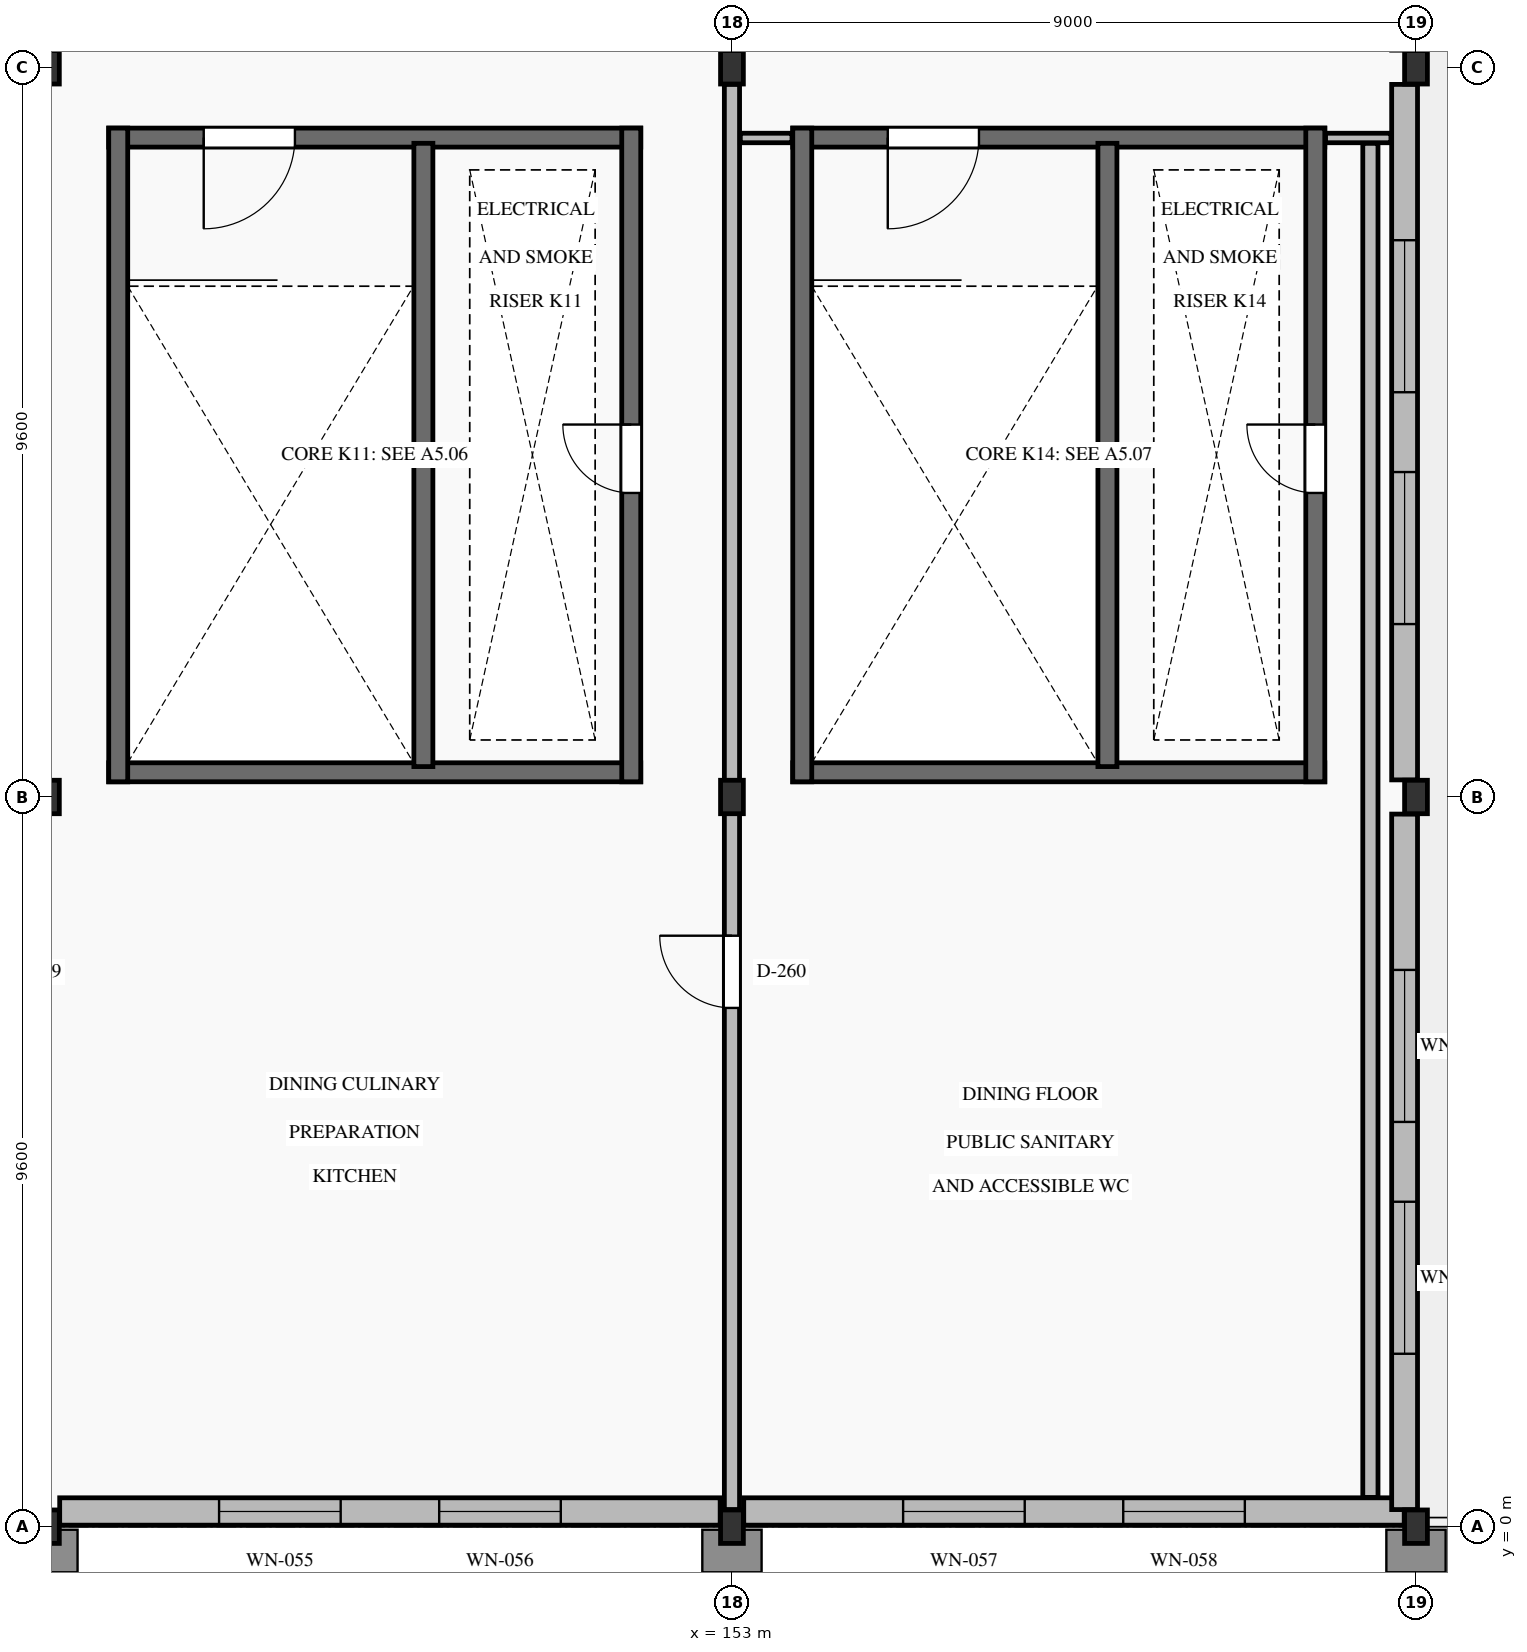
"""IFC4 building model, lengths in metres.
Left out: names, types, materials, properties, quantities, classifications, styles, units other than length and angle.
Written with IfcOpenShell. Run it as: python <this file> out.ifc"""

import sys

from ifc_helpers import new_model, si_unit, direction, frame, frame_2d, origin, origin_2d, place, context, subcontext, project, spatial, rectangle, i_section, extrude, element, fill, save


model = new_model("IFC4")
c1 = context("Model", 3, precision=1e-05, world=origin(), true_north=direction((0.0, 1.0)))
c2 = subcontext(c1, "Body", "Model", "MODEL_VIEW")
j1 = project(units=[si_unit("LENGTHUNIT", "METRE"), si_unit("PLANEANGLEUNIT", "RADIAN")], contexts=[c1])
p1 = place(None, origin())
s1 = spatial("IfcSite", under=j1, at=p1, CompositionType="ELEMENT")
p2 = place(p1, origin())
s2 = spatial("IfcBuilding", under=s1, at=p2, CompositionType="ELEMENT")
p3 = place(p2, frame((0.0, 0.0, 10.8)))
s3 = spatial("IfcBuildingStorey", under=s2, at=p3, CompositionType="ELEMENT", Elevation=10.8)
for number, where, z_axis, x_axis in (
    (1, (144.0, 0.0, 0.0), (0.0, 0.0, 1.0), (1.0, 0.0, 0.0)),
    (2, (144.0, 9.6, 0.0), (0.0, 0.0, 1.0), (1.0, 0.0, 0.0)),
    (3, (144.0, 19.2, 0.0), (0.0, 0.0, 1.0), (1.0, 0.0, 0.0)),
    (4, (153.0, 0.0, 0.0), (0.0, 0.0, 1.0), (1.0, 0.0, 0.0)),
    (5, (153.0, 9.6, 0.0), (0.0, 0.0, 1.0), (1.0, 0.0, 0.0)),
    (6, (153.0, 19.2, 0.0), (0.0, 0.0, 1.0), (1.0, 0.0, 0.0)),
    (7, (162.0, 0.0, 0.0), (0.0, 0.0, 1.0), (1.0, 0.0, 0.0)),
    (8, (162.0, 9.6, 0.0), (0.0, 0.0, 1.0), (1.0, 0.0, 0.0)),
    (9, (162.0, 19.2, 0.0), (0.0, 0.0, 1.0), (1.0, 0.0, 0.0)),
):
    element("IfcColumn", number, at=place(p3, frame(where, z_axis=z_axis, x_axis=x_axis)), inside=s3, PredefinedType="COLUMN", context=c2, shape_type="SweptSolid", body=[
        extrude(i_section(OverallWidth=0.3, OverallDepth=0.44, WebThickness=0.011, FlangeThickness=0.021, FilletRadius=0.027, at=origin_2d()), origin(), (0.0, 0.0, 1.0), 4.2),
    ])
p4 = place(p3, frame((144.155, 0.2, 0.0), z_axis=(0.0, 0.0, 1.0), x_axis=(1.0, 0.0, 0.0)))
e10 = element("IfcWall", 10, at=p4, inside=s3, PredefinedType="SOLIDWALL", context=c2, shape_type="SweptSolid", body=[
    extrude(rectangle(XDim=8.69, YDim=0.36, at=frame_2d((4.345, 0.0))), origin(), (0.0, 0.0, 1.0), 3.665),
])
p5 = place(p4, frame((2.097, 0.0, 0.95)))
e11 = element("IfcOpeningElement", 11, at=p5, cuts=e10, PredefinedType="OPENING", context=c2, shape_type="SweptSolid", body=[
    extrude(rectangle(XDim=1.6, YDim=2.2, at=frame_2d((0.8, 1.1))), frame((0.0, 0.195, 0.0), z_axis=(0.0, -1.0, 0.0), x_axis=(1.0, 0.0, 0.0)), (0.0, 0.0, 1.0), 0.39),
])
p6 = place(p4, frame((4.993, 0.0, 0.95)))
e12 = element("IfcOpeningElement", 12, at=p6, cuts=e10, PredefinedType="OPENING", context=c2, shape_type="SweptSolid", body=[
    extrude(rectangle(XDim=1.6, YDim=2.2, at=frame_2d((0.8, 1.1))), frame((0.0, 0.195, 0.0), z_axis=(0.0, -1.0, 0.0), x_axis=(1.0, 0.0, 0.0)), (0.0, 0.0, 1.0), 0.39),
])
p7 = place(p3, frame((153.155, 0.2, 0.0), z_axis=(0.0, 0.0, 1.0), x_axis=(1.0, 0.0, 0.0)))
e13 = element("IfcWall", 13, at=p7, inside=s3, PredefinedType="SOLIDWALL", context=c2, shape_type="SweptSolid", body=[
    extrude(rectangle(XDim=8.69, YDim=0.36, at=frame_2d((4.345, 0.0))), origin(), (0.0, 0.0, 1.0), 3.665),
])
p8 = place(p7, frame((2.097, 0.0, 0.95)))
e14 = element("IfcOpeningElement", 14, at=p8, cuts=e13, PredefinedType="OPENING", context=c2, shape_type="SweptSolid", body=[
    extrude(rectangle(XDim=1.6, YDim=2.2, at=frame_2d((0.8, 1.1))), frame((0.0, 0.195, 0.0), z_axis=(0.0, -1.0, 0.0), x_axis=(1.0, 0.0, 0.0)), (0.0, 0.0, 1.0), 0.39),
])
p9 = place(p7, frame((4.993, 0.0, 0.95)))
e15 = element("IfcOpeningElement", 15, at=p9, cuts=e13, PredefinedType="OPENING", context=c2, shape_type="SweptSolid", body=[
    extrude(rectangle(XDim=1.6, YDim=2.2, at=frame_2d((0.8, 1.1))), frame((0.0, 0.195, 0.0), z_axis=(0.0, -1.0, 0.0), x_axis=(1.0, 0.0, 0.0)), (0.0, 0.0, 1.0), 0.39),
])
p10 = place(p3, frame((161.85, 0.225, 0.0), z_axis=(0.0, 0.0, 1.0), x_axis=(0.0, 1.0, 0.0)))
e16 = element("IfcWall", 16, at=p10, inside=s3, PredefinedType="SOLIDWALL", context=c2, shape_type="SweptSolid", body=[
    extrude(rectangle(XDim=9.15, YDim=0.34, at=frame_2d((4.575, 0.0))), origin(), (0.0, 0.0, 1.0), 3.645),
])
p11 = place(p10, frame((2.05, 0.0, 0.95)))
e17 = element("IfcOpeningElement", 17, at=p11, cuts=e16, PredefinedType="OPENING", context=c2, shape_type="SweptSolid", body=[
    extrude(rectangle(XDim=2.0, YDim=2.4, at=frame_2d((1.0, 1.2))), frame((0.0, 0.185, 0.0), z_axis=(0.0, -1.0, 0.0), x_axis=(1.0, 0.0, 0.0)), (0.0, 0.0, 1.0), 0.37),
])
p12 = place(p10, frame((5.1, 0.0, 0.95)))
e18 = element("IfcOpeningElement", 18, at=p12, cuts=e16, PredefinedType="OPENING", context=c2, shape_type="SweptSolid", body=[
    extrude(rectangle(XDim=2.0, YDim=2.4, at=frame_2d((1.0, 1.2))), frame((0.0, 0.185, 0.0), z_axis=(0.0, -1.0, 0.0), x_axis=(1.0, 0.0, 0.0)), (0.0, 0.0, 1.0), 0.37),
])
p13 = place(p3, frame((161.85, 9.825, 0.0), z_axis=(0.0, 0.0, 1.0), x_axis=(0.0, 1.0, 0.0)))
e19 = element("IfcWall", 19, at=p13, inside=s3, PredefinedType="SOLIDWALL", context=c2, shape_type="SweptSolid", body=[
    extrude(rectangle(XDim=9.15, YDim=0.34, at=frame_2d((4.575, 0.0))), origin(), (0.0, 0.0, 1.0), 3.645),
])
p14 = place(p13, frame((2.05, 0.0, 0.95)))
e20 = element("IfcOpeningElement", 20, at=p14, cuts=e19, PredefinedType="OPENING", context=c2, shape_type="SweptSolid", body=[
    extrude(rectangle(XDim=2.0, YDim=2.4, at=frame_2d((1.0, 1.2))), frame((0.0, 0.185, 0.0), z_axis=(0.0, -1.0, 0.0), x_axis=(1.0, 0.0, 0.0)), (0.0, 0.0, 1.0), 0.37),
])
p15 = place(p13, frame((5.1, 0.0, 0.95)))
e21 = element("IfcOpeningElement", 21, at=p15, cuts=e19, PredefinedType="OPENING", context=c2, shape_type="SweptSolid", body=[
    extrude(rectangle(XDim=2.0, YDim=2.4, at=frame_2d((1.0, 1.2))), frame((0.0, 0.185, 0.0), z_axis=(0.0, -1.0, 0.0), x_axis=(1.0, 0.0, 0.0)), (0.0, 0.0, 1.0), 0.37),
])
p16 = place(p3, frame((144.8, 9.925, 0.0), z_axis=(0.0, 0.0, 1.0), x_axis=(1.0, 0.0, 0.0)))
e22 = element("IfcWall", 22, at=p16, inside=s3, PredefinedType="SHEAR", context=c2, shape_type="SweptSolid", body=[
    extrude(rectangle(XDim=7.0, YDim=0.25, at=frame_2d((3.5, 0.0))), origin(), (0.0, 0.0, 1.0), 4.2),
])
p17 = place(p3, frame((144.8, 18.275, 0.0), z_axis=(0.0, 0.0, 1.0), x_axis=(1.0, 0.0, 0.0)))
e23 = element("IfcWall", 23, at=p17, inside=s3, PredefinedType="SHEAR", context=c2, shape_type="SweptSolid", body=[
    extrude(rectangle(XDim=7.0, YDim=0.25, at=frame_2d((3.5, 0.0))), origin(), (0.0, 0.0, 1.0), 4.2),
])
p18 = place(p17, frame((1.25, 0.0, 0.0)))
e24 = element("IfcOpeningElement", 24, at=p18, cuts=e23, PredefinedType="OPENING", context=c2, shape_type="SweptSolid", body=[
    extrude(rectangle(XDim=1.2, YDim=2.15, at=frame_2d((0.6, 1.075))), frame((0.0, 0.14, 0.0), z_axis=(0.0, -1.0, 0.0), x_axis=(1.0, 0.0, 0.0)), (0.0, 0.0, 1.0), 0.28),
])
p19 = place(p3, frame((144.925, 9.8, 0.0), z_axis=(0.0, 0.0, 1.0), x_axis=(0.0, 1.0, 0.0)))
e25 = element("IfcWall", 25, at=p19, inside=s3, PredefinedType="SHEAR", context=c2, shape_type="SweptSolid", body=[
    extrude(rectangle(XDim=8.6, YDim=0.25, at=frame_2d((4.3, 0.0))), origin(), (0.0, 0.0, 1.0), 4.2),
])
p20 = place(p3, frame((151.675, 9.8, 0.0), z_axis=(0.0, 0.0, 1.0), x_axis=(0.0, 1.0, 0.0)))
e26 = element("IfcWall", 26, at=p20, inside=s3, PredefinedType="SHEAR", context=c2, shape_type="SweptSolid", body=[
    extrude(rectangle(XDim=8.6, YDim=0.25, at=frame_2d((4.3, 0.0))), origin(), (0.0, 0.0, 1.0), 4.2),
])
p21 = place(p20, frame((3.8, 0.0, 0.0)))
e27 = element("IfcOpeningElement", 27, at=p21, cuts=e26, PredefinedType="OPENING", context=c2, shape_type="SweptSolid", body=[
    extrude(rectangle(XDim=0.9, YDim=2.05, at=frame_2d((0.45, 1.025))), frame((0.0, 0.14, 0.0), z_axis=(0.0, -1.0, 0.0), x_axis=(1.0, 0.0, 0.0)), (0.0, 0.0, 1.0), 0.28),
])
p22 = place(p3, frame((148.94, 10.0, 0.0), z_axis=(0.0, 0.0, 1.0), x_axis=(0.0, 1.0, 0.0)))
e28 = element("IfcWall", 28, at=p22, inside=s3, PredefinedType="SHEAR", context=c2, shape_type="SweptSolid", body=[
    extrude(rectangle(XDim=8.2, YDim=0.25, at=frame_2d((4.1, 0.0))), origin(), (0.0, 0.0, 1.0), 4.2),
])
p23 = place(p3, frame((153.8, 9.925, 0.0), z_axis=(0.0, 0.0, 1.0), x_axis=(1.0, 0.0, 0.0)))
e29 = element("IfcWall", 29, at=p23, inside=s3, PredefinedType="SHEAR", context=c2, shape_type="SweptSolid", body=[
    extrude(rectangle(XDim=7.0, YDim=0.25, at=frame_2d((3.5, 0.0))), origin(), (0.0, 0.0, 1.0), 4.2),
])
p24 = place(p3, frame((153.8, 18.275, 0.0), z_axis=(0.0, 0.0, 1.0), x_axis=(1.0, 0.0, 0.0)))
e30 = element("IfcWall", 30, at=p24, inside=s3, PredefinedType="SHEAR", context=c2, shape_type="SweptSolid", body=[
    extrude(rectangle(XDim=7.0, YDim=0.25, at=frame_2d((3.5, 0.0))), origin(), (0.0, 0.0, 1.0), 4.2),
])
p25 = place(p24, frame((1.25, 0.0, 0.0)))
e31 = element("IfcOpeningElement", 31, at=p25, cuts=e30, PredefinedType="OPENING", context=c2, shape_type="SweptSolid", body=[
    extrude(rectangle(XDim=1.2, YDim=2.15, at=frame_2d((0.6, 1.075))), frame((0.0, 0.14, 0.0), z_axis=(0.0, -1.0, 0.0), x_axis=(1.0, 0.0, 0.0)), (0.0, 0.0, 1.0), 0.28),
])
p26 = place(p3, frame((153.925, 9.8, 0.0), z_axis=(0.0, 0.0, 1.0), x_axis=(0.0, 1.0, 0.0)))
e32 = element("IfcWall", 32, at=p26, inside=s3, PredefinedType="SHEAR", context=c2, shape_type="SweptSolid", body=[
    extrude(rectangle(XDim=8.6, YDim=0.25, at=frame_2d((4.3, 0.0))), origin(), (0.0, 0.0, 1.0), 4.2),
])
p27 = place(p3, frame((160.675, 9.8, 0.0), z_axis=(0.0, 0.0, 1.0), x_axis=(0.0, 1.0, 0.0)))
e33 = element("IfcWall", 33, at=p27, inside=s3, PredefinedType="SHEAR", context=c2, shape_type="SweptSolid", body=[
    extrude(rectangle(XDim=8.6, YDim=0.25, at=frame_2d((4.3, 0.0))), origin(), (0.0, 0.0, 1.0), 4.2),
])
p28 = place(p27, frame((3.8, 0.0, 0.0)))
e34 = element("IfcOpeningElement", 34, at=p28, cuts=e33, PredefinedType="OPENING", context=c2, shape_type="SweptSolid", body=[
    extrude(rectangle(XDim=0.9, YDim=2.05, at=frame_2d((0.45, 1.025))), frame((0.0, 0.14, 0.0), z_axis=(0.0, -1.0, 0.0), x_axis=(1.0, 0.0, 0.0)), (0.0, 0.0, 1.0), 0.28),
])
p29 = place(p3, frame((157.94, 10.0, 0.0), z_axis=(0.0, 0.0, 1.0), x_axis=(0.0, 1.0, 0.0)))
e35 = element("IfcWall", 35, at=p29, inside=s3, PredefinedType="SHEAR", context=c2, shape_type="SweptSolid", body=[
    extrude(rectangle(XDim=8.2, YDim=0.25, at=frame_2d((4.1, 0.0))), origin(), (0.0, 0.0, 1.0), 4.2),
])
p30 = place(p3, frame((153.0, 0.225, 0.0), z_axis=(0.0, 0.0, 1.0), x_axis=(0.0, 1.0, 0.0)))
e36 = element("IfcWall", 36, at=p30, inside=s3, PredefinedType="PARTITIONING", context=c2, shape_type="SweptSolid", body=[
    extrude(rectangle(XDim=18.75, YDim=0.2, at=frame_2d((9.375, 0.0))), origin(), (0.0, 0.0, 1.0), 3.615),
])
p31 = place(p30, frame((6.6, 0.0, 0.0)))
e37 = element("IfcOpeningElement", 37, at=p31, cuts=e36, PredefinedType="OPENING", context=c2, shape_type="SweptSolid", body=[
    extrude(rectangle(XDim=0.95, YDim=2.1, at=frame_2d((0.475, 1.05))), frame((0.0, 0.115, 0.0), z_axis=(0.0, -1.0, 0.0), x_axis=(1.0, 0.0, 0.0)), (0.0, 0.0, 1.0), 0.23),
])
p32 = place(p3, frame((161.4, 0.385, 0.0), z_axis=(0.0, 0.0, 1.0), x_axis=(0.0, 1.0, 0.0)))
e38 = element("IfcWall", 38, at=p32, inside=s3, PredefinedType="PARTITIONING", context=c2, shape_type="SweptSolid", body=[
    extrude(rectangle(XDim=17.815, YDim=0.2, at=frame_2d((8.907, 0.0))), origin(), (0.0, 0.0, 1.0), 3.94),
])
p33 = place(p3, frame((153.11, 18.27, 0.0), z_axis=(0.0, 0.0, 1.0), x_axis=(1.0, 0.0, 0.0)))
e39 = element("IfcWall", 39, at=p33, inside=s3, PredefinedType="PARTITIONING", context=c2, shape_type="SweptSolid", body=[
    extrude(rectangle(XDim=0.68, YDim=0.125, at=frame_2d((0.34, 0.0))), origin(), (0.0, 0.0, 1.0), 3.94),
])
p34 = place(p3, frame((160.81, 18.27, 0.0), z_axis=(0.0, 0.0, 1.0), x_axis=(1.0, 0.0, 0.0)))
e40 = element("IfcWall", 40, at=p34, inside=s3, PredefinedType="PARTITIONING", context=c2, shape_type="SweptSolid", body=[
    extrude(rectangle(XDim=0.86, YDim=0.125, at=frame_2d((0.43, 0.0))), origin(), (0.0, 0.0, 1.0), 3.94),
])
p35 = place(p5, origin())
e41 = element("IfcWindow", 41, at=p35, inside=s3, PartitioningType="SINGLE_PANEL", PredefinedType="WINDOW", context=c2, shape_type="SweptSolid", body=[
    extrude(rectangle(XDim=1.6, YDim=2.2, at=frame_2d((0.8, 1.1))), frame((0.0, 0.03, 0.0), z_axis=(0.0, -1.0, 0.0), x_axis=(1.0, 0.0, 0.0)), (0.0, 0.0, 1.0), 0.06),
])
fill(e11, e41)
p36 = place(p6, origin())
e42 = element("IfcWindow", 42, at=p36, inside=s3, PartitioningType="SINGLE_PANEL", PredefinedType="WINDOW", context=c2, shape_type="SweptSolid", body=[
    extrude(rectangle(XDim=1.6, YDim=2.2, at=frame_2d((0.8, 1.1))), frame((0.0, 0.03, 0.0), z_axis=(0.0, -1.0, 0.0), x_axis=(1.0, 0.0, 0.0)), (0.0, 0.0, 1.0), 0.06),
])
fill(e12, e42)
p37 = place(p8, origin())
e43 = element("IfcWindow", 43, at=p37, inside=s3, PartitioningType="SINGLE_PANEL", PredefinedType="WINDOW", context=c2, shape_type="SweptSolid", body=[
    extrude(rectangle(XDim=1.6, YDim=2.2, at=frame_2d((0.8, 1.1))), frame((0.0, 0.03, 0.0), z_axis=(0.0, -1.0, 0.0), x_axis=(1.0, 0.0, 0.0)), (0.0, 0.0, 1.0), 0.06),
])
fill(e14, e43)
p38 = place(p9, origin())
e44 = element("IfcWindow", 44, at=p38, inside=s3, PartitioningType="SINGLE_PANEL", PredefinedType="WINDOW", context=c2, shape_type="SweptSolid", body=[
    extrude(rectangle(XDim=1.6, YDim=2.2, at=frame_2d((0.8, 1.1))), frame((0.0, 0.03, 0.0), z_axis=(0.0, -1.0, 0.0), x_axis=(1.0, 0.0, 0.0)), (0.0, 0.0, 1.0), 0.06),
])
fill(e15, e44)
p39 = place(p11, origin())
e45 = element("IfcWindow", 45, at=p39, inside=s3, PartitioningType="SINGLE_PANEL", PredefinedType="WINDOW", context=c2, shape_type="SweptSolid", body=[
    extrude(rectangle(XDim=2.0, YDim=2.4, at=frame_2d((1.0, 1.2))), frame((0.0, 0.03, 0.0), z_axis=(0.0, -1.0, 0.0), x_axis=(1.0, 0.0, 0.0)), (0.0, 0.0, 1.0), 0.06),
])
fill(e17, e45)
p40 = place(p12, origin())
e46 = element("IfcWindow", 46, at=p40, inside=s3, PartitioningType="SINGLE_PANEL", PredefinedType="WINDOW", context=c2, shape_type="SweptSolid", body=[
    extrude(rectangle(XDim=2.0, YDim=2.4, at=frame_2d((1.0, 1.2))), frame((0.0, 0.03, 0.0), z_axis=(0.0, -1.0, 0.0), x_axis=(1.0, 0.0, 0.0)), (0.0, 0.0, 1.0), 0.06),
])
fill(e18, e46)
p41 = place(p14, origin())
e47 = element("IfcWindow", 47, at=p41, inside=s3, PartitioningType="SINGLE_PANEL", PredefinedType="WINDOW", context=c2, shape_type="SweptSolid", body=[
    extrude(rectangle(XDim=2.0, YDim=2.4, at=frame_2d((1.0, 1.2))), frame((0.0, 0.03, 0.0), z_axis=(0.0, -1.0, 0.0), x_axis=(1.0, 0.0, 0.0)), (0.0, 0.0, 1.0), 0.06),
])
fill(e20, e47)
p42 = place(p15, origin())
e48 = element("IfcWindow", 48, at=p42, inside=s3, PartitioningType="SINGLE_PANEL", PredefinedType="WINDOW", context=c2, shape_type="SweptSolid", body=[
    extrude(rectangle(XDim=2.0, YDim=2.4, at=frame_2d((1.0, 1.2))), frame((0.0, 0.03, 0.0), z_axis=(0.0, -1.0, 0.0), x_axis=(1.0, 0.0, 0.0)), (0.0, 0.0, 1.0), 0.06),
])
fill(e21, e48)
p43 = place(p18, frame((1.2, 0.0, 0.0), z_axis=(0.0, 0.0, 1.0), x_axis=(-1.0, 0.0, 0.0)))
e49 = element("IfcDoor", 49, at=p43, inside=s3, OperationType="SINGLE_SWING_LEFT", PredefinedType="DOOR", context=c2, shape_type="SweptSolid", body=[
    extrude(rectangle(XDim=1.2, YDim=2.15, at=frame_2d((0.6, 1.075))), frame((0.0, 0.025, 0.0), z_axis=(0.0, -1.0, 0.0), x_axis=(1.0, 0.0, 0.0)), (0.0, 0.0, 1.0), 0.05),
])
fill(e24, e49)
p44 = place(p21, origin())
e50 = element("IfcDoor", 50, at=p44, inside=s3, OperationType="SINGLE_SWING_RIGHT", PredefinedType="DOOR", context=c2, shape_type="SweptSolid", body=[
    extrude(rectangle(XDim=0.9, YDim=2.05, at=frame_2d((0.45, 1.025))), frame((0.0, 0.025, 0.0), z_axis=(0.0, -1.0, 0.0), x_axis=(1.0, 0.0, 0.0)), (0.0, 0.0, 1.0), 0.05),
])
fill(e27, e50)
p45 = place(p25, frame((1.2, 0.0, 0.0), z_axis=(0.0, 0.0, 1.0), x_axis=(-1.0, 0.0, 0.0)))
e51 = element("IfcDoor", 51, at=p45, inside=s3, OperationType="SINGLE_SWING_LEFT", PredefinedType="DOOR", context=c2, shape_type="SweptSolid", body=[
    extrude(rectangle(XDim=1.2, YDim=2.15, at=frame_2d((0.6, 1.075))), frame((0.0, 0.025, 0.0), z_axis=(0.0, -1.0, 0.0), x_axis=(1.0, 0.0, 0.0)), (0.0, 0.0, 1.0), 0.05),
])
fill(e31, e51)
p46 = place(p28, origin())
e52 = element("IfcDoor", 52, at=p46, inside=s3, OperationType="SINGLE_SWING_RIGHT", PredefinedType="DOOR", context=c2, shape_type="SweptSolid", body=[
    extrude(rectangle(XDim=0.9, YDim=2.05, at=frame_2d((0.45, 1.025))), frame((0.0, 0.025, 0.0), z_axis=(0.0, -1.0, 0.0), x_axis=(1.0, 0.0, 0.0)), (0.0, 0.0, 1.0), 0.05),
])
fill(e34, e52)
p47 = place(p31, origin())
e53 = element("IfcDoor", 53, at=p47, inside=s3, OperationType="SINGLE_SWING_RIGHT", PredefinedType="DOOR", context=c2, shape_type="SweptSolid", body=[
    extrude(rectangle(XDim=0.95, YDim=2.1, at=frame_2d((0.475, 1.05))), frame((0.0, 0.025, 0.0), z_axis=(0.0, -1.0, 0.0), x_axis=(1.0, 0.0, 0.0)), (0.0, 0.0, 1.0), 0.05),
])
fill(e37, e53)
save(model, sys.argv[1])
